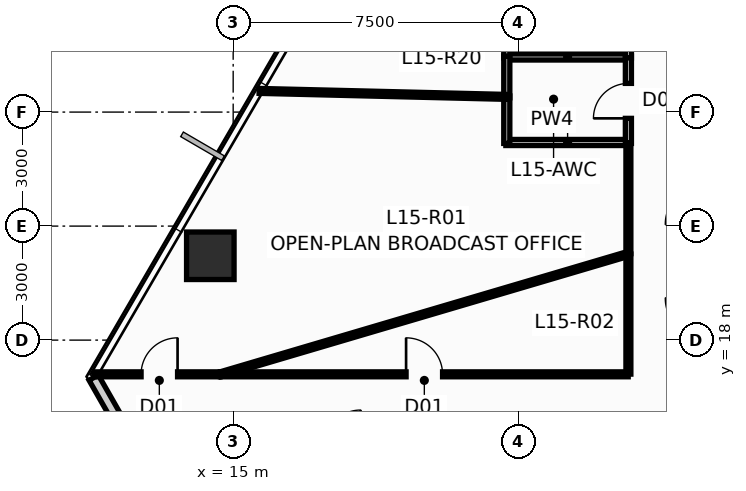
"""IFC4 building model, lengths in metres.
Left out: names, types, materials, properties, quantities, classifications, styles, units other than length and angle.
Written with IfcOpenShell. Run it as: python <this file> out.ifc"""

import sys

from ifc_helpers import new_model, si_unit, direction, frame, frame_2d, origin, origin_2d, place, context, subcontext, project, spatial, rectangle, hollow_rectangle, extrude, source, transform, mapped, element, fill, save


model = new_model("IFC4")
c1 = context("Model", 3, precision=1e-05, world=origin(), true_north=direction((0.0, 1.0)))
c2 = subcontext(c1, "Body", "Model", "MODEL_VIEW")
j1 = project(units=[si_unit("LENGTHUNIT", "METRE"), si_unit("PLANEANGLEUNIT", "RADIAN")], contexts=[c1])
p1 = place(None, origin())
s1 = spatial("IfcSite", under=j1, at=p1, CompositionType="ELEMENT")
p2 = place(p1, origin())
s2 = spatial("IfcBuilding", under=s1, at=p2, CompositionType="ELEMENT")
p3 = place(p2, frame((0.0, 0.0, 60.45)))
s3 = spatial("IfcBuildingStorey", under=s2, at=p3, CompositionType="ELEMENT", Elevation=60.45)
m1 = source(origin(), c2, "Body", "SweptSolid", [
    extrude(hollow_rectangle(XDim=1.25, YDim=1.25, WallThickness=0.07, at=origin_2d()), origin(), (0.0, 0.0, 1.0), 3.651),
])
p4 = place(p3, frame((14.398, 20.219, 0.0), z_axis=(0.010364239282, -0.021530871282, 0.999714461297), x_axis=(0.901042175273, 0.433731481886, 0.0)))
e1 = element("IfcColumn", 1, at=p4, inside=s3, PredefinedType="COLUMN", context=c2, shape_type="MappedRepresentation", body=[
    mapped(m1, transform((0.0, 0.0, 0.0), scale=1.0)),
])
p5 = place(p3, frame((18.497, 4.465, 0.0), z_axis=(0.0, 0.0, 1.0), x_axis=(-0.495984276953, 0.868331501798, 0.0)))
e2 = element("IfcWall", 2, at=p5, inside=s3, PredefinedType="STANDARD", context=c2, shape_type="SweptSolid", body=[
    extrude(rectangle(XDim=14.45, YDim=0.28, at=frame_2d((7.225, 0.0))), origin(), (0.0, 0.0, 1.0), 3.4),
])
p6 = place(p5, frame((7.68, 0.0, 0.9)))
e3 = element("IfcOpeningElement", 3, at=p6, cuts=e2, PredefinedType="OPENING", context=c2, shape_type="SweptSolid", body=[
    extrude(rectangle(XDim=1.8, YDim=1.8, at=frame_2d((0.9, 0.9))), frame((0.0, 0.152, 0.0), z_axis=(0.0, -1.0, 0.0), x_axis=(1.0, 0.0, 0.0)), (0.0, 0.0, 1.0), 0.304),
])
for number, where, z_axis, x_axis in (
    (4, (22.175, 23.2, 0.0), (0.0, 0.0, 1.0), (1.0, 0.0, 0.0)),
    (5, (22.175, 25.45, 0.0), (0.0, 0.0, 1.0), (1.0, 0.0, 0.0)),
):
    element("IfcWall", number, at=place(p3, frame(where, z_axis=z_axis, x_axis=x_axis)), inside=s3, PredefinedType="PLUMBINGWALL", context=c2, shape_type="SweptSolid", body=[
        extrude(rectangle(XDim=3.25, YDim=0.16, at=frame_2d((1.625, 0.0))), origin(), (0.0, 0.0, 1.0), 3.4),
    ])
p7 = place(p3, frame((25.4, 23.175, 0.0), z_axis=(0.0, 0.0, 1.0), x_axis=(0.0, 1.0, 0.0)))
e6 = element("IfcWall", 6, at=p7, inside=s3, PredefinedType="PLUMBINGWALL", context=c2, shape_type="SweptSolid", body=[
    extrude(rectangle(XDim=2.3, YDim=0.16, at=frame_2d((1.15, 0.0))), origin(), (0.0, 0.0, 1.0), 3.026),
])
p8 = place(p7, frame((0.66, 0.0, 0.0)))
e7 = element("IfcOpeningElement", 7, at=p8, cuts=e6, PredefinedType="OPENING", context=c2, shape_type="SweptSolid", body=[
    extrude(rectangle(XDim=0.92, YDim=2.1, at=frame_2d((0.46, 1.05))), frame((0.0, 0.092, 0.0), z_axis=(0.0, -1.0, 0.0), x_axis=(1.0, 0.0, 0.0)), (0.0, 0.0, 1.0), 0.184),
])
p9 = place(p3, frame((25.4, 25.425, 0.0), z_axis=(0.0, 0.0, 1.0), x_axis=(0.0, 1.0, 0.0)))
e8 = element("IfcWall", 8, at=p9, inside=s3, PredefinedType="PLUMBINGWALL", context=c2, shape_type="SweptSolid", body=[
    extrude(rectangle(XDim=2.3, YDim=0.16, at=frame_2d((1.15, 0.0))), origin(), (0.0, 0.0, 1.0), 3.026),
])
p10 = place(p9, frame((0.66, 0.0, 0.0)))
e9 = element("IfcOpeningElement", 9, at=p10, cuts=e8, PredefinedType="OPENING", context=c2, shape_type="SweptSolid", body=[
    extrude(rectangle(XDim=0.92, YDim=2.1, at=frame_2d((0.46, 1.05))), frame((0.0, 0.092, 0.0), z_axis=(0.0, -1.0, 0.0), x_axis=(1.0, 0.0, 0.0)), (0.0, 0.0, 1.0), 0.184),
])
p11 = place(p3, frame((22.2, 25.425, 0.0), z_axis=(0.0, 0.0, 1.0), x_axis=(0.0, 1.0, 0.0)))
e10 = element("IfcWall", 10, at=p11, inside=s3, PredefinedType="PLUMBINGWALL", context=c2, shape_type="SweptSolid", body=[
    extrude(rectangle(XDim=2.3, YDim=0.16, at=frame_2d((1.15, 0.0))), origin(), (0.0, 0.0, 1.0), 3.026),
])
p12 = place(p3, frame((22.2, 24.425, 0.0), z_axis=(0.0, 0.0, 1.0), x_axis=(0.0, -1.0, 0.0)))
e11 = element("IfcWall", 11, at=p12, inside=s3, PredefinedType="PLUMBINGWALL", context=c2, shape_type="SweptSolid", body=[
    extrude(rectangle(XDim=1.25, YDim=0.16, at=frame_2d((0.625, 0.0))), origin(), (0.0, 0.0, 1.0), 3.026),
])
p13 = place(p3, frame((22.2, 24.375, 0.0), z_axis=(0.0, 0.0, 1.0), x_axis=(0.0, 1.0, 0.0)))
e12 = element("IfcWall", 12, at=p13, inside=s3, PredefinedType="PLUMBINGWALL", context=c2, shape_type="SweptSolid", body=[
    extrude(rectangle(XDim=1.1, YDim=0.16, at=frame_2d((0.55, 0.0))), origin(), (0.0, 0.0, 1.0), 3.4),
])
p14 = place(p3, frame((14.665, 17.101, 0.0), z_axis=(0.0, 0.0, 1.0), x_axis=(0.959072405606, 0.283160945055, 0.0)))
e13 = element("IfcWall", 13, at=p14, inside=s3, PredefinedType="PARTITIONING", context=c2, shape_type="SweptSolid", body=[
    extrude(rectangle(XDim=11.188, YDim=0.13, at=frame_2d((5.594, 0.0))), origin(), (0.0, 0.0, 1.0), 3.4),
])
p15 = place(p3, frame((14.665, 17.1, 0.0), z_axis=(0.0, 0.0, 1.0), x_axis=(1.0, 0.0, 0.0)))
e14 = element("IfcWall", 14, at=p15, inside=s3, PredefinedType="PARTITIONING", context=c2, shape_type="SweptSolid", body=[
    extrude(rectangle(XDim=10.73, YDim=0.13, at=frame_2d((5.365, 0.0))), origin(), (0.0, 0.0, 1.0), 3.4),
])
p16 = place(p15, frame((4.885, 0.0, 0.0)))
e15 = element("IfcOpeningElement", 15, at=p16, cuts=e14, PredefinedType="OPENING", context=c2, shape_type="SweptSolid", body=[
    extrude(rectangle(XDim=0.96, YDim=2.15, at=frame_2d((0.48, 1.075))), frame((0.0, 0.077, 0.0), z_axis=(0.0, -1.0, 0.0), x_axis=(1.0, 0.0, 0.0)), (0.0, 0.0, 1.0), 0.154),
])
p17 = place(p3, frame((15.684, 24.558, 0.0), z_axis=(0.0, 0.0, 1.0), x_axis=(0.999706799028, -0.024213962438, 0.0)))
e16 = element("IfcWall", 16, at=p17, inside=s3, PredefinedType="PARTITIONING", context=c2, shape_type="SweptSolid", body=[
    extrude(rectangle(XDim=6.513, YDim=0.13, at=frame_2d((3.257, 0.0))), origin(), (0.0, 0.0, 1.0), 3.4),
])
p18 = place(p3, frame((11.345, 17.1, 0.0), z_axis=(0.0, 0.0, 1.0), x_axis=(1.0, 0.0, 0.0)))
e17 = element("IfcWall", 17, at=p18, inside=s3, PredefinedType="PARTITIONING", context=c2, shape_type="SweptSolid", body=[
    extrude(rectangle(XDim=3.31, YDim=0.13, at=frame_2d((1.655, 0.0))), origin(), (0.0, 0.0, 1.0), 3.4),
])
p19 = place(p18, frame((1.232, 0.0, 0.0)))
e18 = element("IfcOpeningElement", 18, at=p19, cuts=e17, PredefinedType="OPENING", context=c2, shape_type="SweptSolid", body=[
    extrude(rectangle(XDim=0.96, YDim=2.15, at=frame_2d((0.48, 1.075))), frame((0.0, 0.077, 0.0), z_axis=(0.0, -1.0, 0.0), x_axis=(1.0, 0.0, 0.0)), (0.0, 0.0, 1.0), 0.154),
])
p20 = place(p3, frame((25.4, 17.105, 0.0), z_axis=(0.0, 0.0, 1.0), x_axis=(0.0, 1.0, 0.0)))
e19 = element("IfcWall", 19, at=p20, inside=s3, PredefinedType="PARTITIONING", context=c2, shape_type="SweptSolid", body=[
    extrude(rectangle(XDim=3.16, YDim=0.13, at=frame_2d((1.58, 0.0))), origin(), (0.0, 0.0, 1.0), 3.4),
])
p21 = place(p3, frame((25.4, 20.275, 0.0), z_axis=(0.0, 0.0, 1.0), x_axis=(0.0, 1.0, 0.0)))
e20 = element("IfcWall", 20, at=p21, inside=s3, PredefinedType="PARTITIONING", context=c2, shape_type="SweptSolid", body=[
    extrude(rectangle(XDim=2.92, YDim=0.13, at=frame_2d((1.46, 0.0))), origin(), (0.0, 0.0, 1.0), 3.4),
])
p22 = place(p8, origin())
e21 = element("IfcDoor", 21, at=p22, inside=s3, OperationType="SINGLE_SWING_LEFT", PredefinedType="DOOR", context=c2, shape_type="SweptSolid", body=[
    extrude(rectangle(XDim=0.92, YDim=2.1, at=frame_2d((0.46, 1.05))), frame((0.0, 0.025, 0.0), z_axis=(0.0, -1.0, 0.0), x_axis=(1.0, 0.0, 0.0)), (0.0, 0.0, 1.0), 0.05),
])
fill(e7, e21)
p23 = place(p16, origin())
e22 = element("IfcDoor", 22, at=p23, inside=s3, OperationType="SINGLE_SWING_LEFT", PredefinedType="DOOR", context=c2, shape_type="SweptSolid", body=[
    extrude(rectangle(XDim=0.96, YDim=2.15, at=frame_2d((0.48, 1.075))), frame((0.0, 0.025, 0.0), z_axis=(0.0, -1.0, 0.0), x_axis=(1.0, 0.0, 0.0)), (0.0, 0.0, 1.0), 0.05),
])
fill(e15, e22)
p24 = place(p19, origin())
e23 = element("IfcDoor", 23, at=p24, inside=s3, OperationType="SINGLE_SWING_RIGHT", PredefinedType="DOOR", context=c2, shape_type="SweptSolid", body=[
    extrude(rectangle(XDim=0.96, YDim=2.15, at=frame_2d((0.48, 1.075))), frame((0.0, 0.025, 0.0), z_axis=(0.0, -1.0, 0.0), x_axis=(1.0, 0.0, 0.0)), (0.0, 0.0, 1.0), 0.05),
])
fill(e18, e23)
save(model, sys.argv[1])
